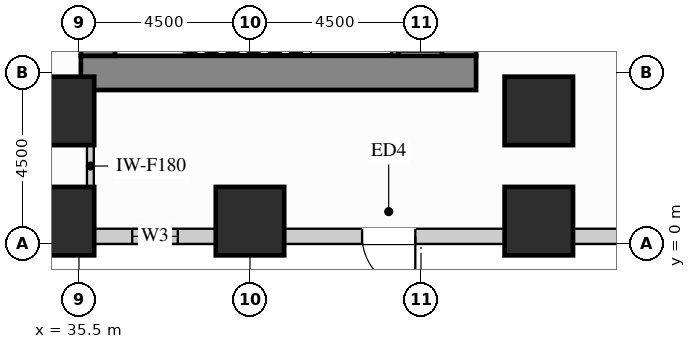
"""IFC4 building model, lengths in metres.
Left out: names, types, materials, properties, quantities, classifications, styles, units other than length and angle.
Written with IfcOpenShell. Run it as: python <this file> out.ifc"""

import sys

from ifc_helpers import new_model, si_unit, direction, frame, frame_2d, origin, origin_2d, place, context, subcontext, project, spatial, rectangle, extrude, source, transform, mapped, element, fill, save


model = new_model("IFC4")
c1 = context("Model", 3, precision=1e-05, world=origin(), true_north=direction((0.0, 1.0)))
c2 = subcontext(c1, "Body", "Model", "MODEL_VIEW")
j1 = project(units=[si_unit("LENGTHUNIT", "METRE"), si_unit("PLANEANGLEUNIT", "RADIAN")], contexts=[c1])
p1 = place(None, origin())
s1 = spatial("IfcSite", under=j1, at=p1, CompositionType="ELEMENT")
p2 = place(p1, origin())
s2 = spatial("IfcBuilding", under=s1, at=p2, CompositionType="ELEMENT")
p3 = place(p2, origin())
s3 = spatial("IfcBuildingStorey", under=s2, at=p3, CompositionType="ELEMENT", Elevation=0.0)
m1 = source(origin(), c2, "Body", "SweptSolid", [
    extrude(rectangle(XDim=1.8, YDim=1.8, at=origin_2d()), origin(), (0.0, 0.0, 1.0), 4.25),
])
for number, where, z_axis, x_axis in (
    (1, (35.0, 0.6, 0.0), (0.0, 0.0, 1.0), (1.0, 0.0, 0.0)),
    (2, (40.0, 0.6, 0.0), (0.0, 0.0, 1.0), (1.0, 0.0, 0.0)),
    (3, (47.6, 0.6, 0.0), (0.0, 0.0, 1.0), (1.0, 0.0, 0.0)),
    (4, (47.6, 3.5, 0.0), (0.0, 0.0, 1.0), (1.0, 0.0, 0.0)),
    (5, (35.0, 3.5, 0.0), (0.0, 0.0, 1.0), (1.0, 0.0, 0.0)),
):
    element("IfcColumn", number, at=place(p3, frame(where, z_axis=z_axis, x_axis=x_axis)), inside=s3, PredefinedType="COLUMN", context=c2, shape_type="MappedRepresentation", body=[
        mapped(m1, transform((0.0, 0.0, 0.0), x_axis=(1.0, 0.0, 0.0), y_axis=(0.0, 1.0, 0.0), z_axis=(0.0, 0.0, 1.0))),
    ])
m2 = source(origin(), c2, "Body", "SweptSolid", [
    extrude(rectangle(XDim=5.6, YDim=0.9, at=frame_2d((2.8, 0.0))), origin(), (0.0, 0.0, 1.0), 4.25),
])
p4 = place(p3, frame((45.5, 4.95, 0.0), z_axis=(0.0, 0.0, 1.0), x_axis=(0.0, 1.0, 0.0)))
e6 = element("IfcWall", 6, at=p4, inside=s3, PredefinedType="SHEAR", context=c2, shape_type="MappedRepresentation", body=[
    mapped(m2, transform((0.0, 0.0, 0.0), x_axis=(1.0, 0.0, 0.0), y_axis=(0.0, 1.0, 0.0), z_axis=(0.0, 0.0, 1.0))),
])
m3 = source(origin(), c2, "Body", "SweptSolid", [
    extrude(rectangle(XDim=10.4, YDim=0.9, at=frame_2d((5.2, 0.0))), origin(), (0.0, 0.0, 1.0), 4.25),
])
p5 = place(p3, frame((35.55, 4.5, 0.0), z_axis=(0.0, 0.0, 1.0), x_axis=(1.0, 0.0, 0.0)))
e7 = element("IfcWall", 7, at=p5, inside=s3, PredefinedType="SHEAR", context=c2, shape_type="MappedRepresentation", body=[
    mapped(m3, transform((0.0, 0.0, 0.0), x_axis=(1.0, 0.0, 0.0), y_axis=(0.0, 1.0, 0.0), z_axis=(0.0, 0.0, 1.0))),
])
p6 = place(p3, frame((36.0, 4.95, 0.0), z_axis=(0.0, 0.0, 1.0), x_axis=(0.0, 1.0, 0.0)))
e8 = element("IfcWall", 8, at=p6, inside=s3, PredefinedType="SHEAR", context=c2, shape_type="MappedRepresentation", body=[
    mapped(m2, transform((0.0, 0.0, 0.0), x_axis=(1.0, 0.0, 0.0), y_axis=(0.0, 1.0, 0.0), z_axis=(0.0, 0.0, 1.0))),
])
p7 = place(p3, frame((35.898, 0.2, 0.0), z_axis=(0.0, 0.0, 1.0), x_axis=(1.0, 0.0, 0.0)))
e9 = element("IfcWall", 9, at=p7, inside=s3, PredefinedType="SOLIDWALL", context=c2, shape_type="SweptSolid", body=[
    extrude(rectangle(XDim=3.204, YDim=0.4, at=frame_2d((1.602, 0.0))), origin(), (0.0, 0.0, 1.0), 3.135),
])
p8 = place(p7, frame((1.002, 0.0, 0.65)))
e10 = element("IfcOpeningElement", 10, at=p8, cuts=e9, PredefinedType="OPENING", context=c2, shape_type="SweptSolid", body=[
    extrude(rectangle(XDim=1.2, YDim=2.305, at=frame_2d((0.6, 1.152))), frame((0.0, 0.21, 0.0), z_axis=(0.0, -1.0, 0.0), x_axis=(1.0, 0.0, 0.0)), (0.0, 0.0, 1.0), 0.42),
])
p9 = place(p3, frame((40.898, 0.2, 0.0), z_axis=(0.0, 0.0, 1.0), x_axis=(1.0, 0.0, 0.0)))
e11 = element("IfcWall", 11, at=p9, inside=s3, PredefinedType="SOLIDWALL", context=c2, shape_type="SweptSolid", body=[
    extrude(rectangle(XDim=5.804, YDim=0.4, at=frame_2d((2.902, 0.0))), origin(), (0.0, 0.0, 1.0), 3.135),
])
p10 = place(p9, frame((2.052, 0.0, 0.0)))
e12 = element("IfcOpeningElement", 12, at=p10, cuts=e11, PredefinedType="OPENING", context=c2, shape_type="SweptSolid", body=[
    extrude(rectangle(XDim=1.4, YDim=2.2, at=frame_2d((0.7, 1.1))), frame((0.0, 0.21, 0.0), z_axis=(0.0, -1.0, 0.0), x_axis=(1.0, 0.0, 0.0)), (0.0, 0.0, 1.0), 0.42),
])
p11 = place(p3, frame((48.498, 0.2, 0.0), z_axis=(0.0, 0.0, 1.0), x_axis=(1.0, 0.0, 0.0)))
e13 = element("IfcWall", 13, at=p11, inside=s3, PredefinedType="SOLIDWALL", context=c2, shape_type="SweptSolid", body=[
    extrude(rectangle(XDim=9.004, YDim=0.4, at=frame_2d((4.502, 0.0))), origin(), (0.0, 0.0, 1.0), 3.135),
])
p12 = place(p11, frame((3.152, 0.0, 0.65)))
e14 = element("IfcOpeningElement", 14, at=p12, cuts=e13, PredefinedType="OPENING", context=c2, shape_type="SweptSolid", body=[
    extrude(rectangle(XDim=2.7, YDim=2.305, at=frame_2d((1.35, 1.152))), frame((0.0, 0.21, 0.0), z_axis=(0.0, -1.0, 0.0), x_axis=(1.0, 0.0, 0.0)), (0.0, 0.0, 1.0), 0.42),
])
m4 = source(origin(), c2, "Body", "SweptSolid", [
    extrude(rectangle(XDim=1.06, YDim=0.18, at=frame_2d((0.53, 0.0))), origin(), (0.0, 0.0, 1.0), 4.235),
])
p13 = place(p3, frame((35.8, 1.52, 0.0), z_axis=(0.0, 0.0, 1.0), x_axis=(0.0, 1.0, 0.0)))
e15 = element("IfcWall", 15, at=p13, inside=s3, PredefinedType="PARTITIONING", context=c2, shape_type="MappedRepresentation", body=[
    mapped(m4, transform((0.0, 0.0, 0.0), x_axis=(1.0, 0.0, 0.0), y_axis=(0.0, 1.0, 0.0), z_axis=(0.0, 0.0, 1.0))),
])
m5 = source(origin(), c2, "Body", "SweptSolid", [
    extrude(rectangle(XDim=3.603, YDim=0.2, at=frame_2d((1.802, 0.0))), origin(), (0.0, 0.0, 1.0), 4.25),
])
p14 = place(p3, frame((43.805, 4.952, 0.0), z_axis=(0.0, 0.0, 1.0), x_axis=(0.0, 1.0, 0.0)))
e16 = element("IfcWall", 16, at=p14, inside=s3, PredefinedType="SHEAR", context=c2, shape_type="MappedRepresentation", body=[
    mapped(m5, transform((0.0, 0.0, 0.0), x_axis=(1.0, 0.0, 0.0), y_axis=(0.0, 1.0, 0.0), z_axis=(0.0, 0.0, 1.0))),
])
m6 = source(origin(), c2, "Body", "SweptSolid", [
    extrude(rectangle(XDim=1.4, YDim=2.2, at=frame_2d((0.7, 1.1))), frame((0.0, 0.025, 0.0), z_axis=(0.0, -1.0, 0.0), x_axis=(1.0, 0.0, 0.0)), (0.0, 0.0, 1.0), 0.05),
])
p15 = place(p10, frame((1.4, 0.0, 0.0), z_axis=(0.0, 0.0, 1.0), x_axis=(-1.0, 0.0, 0.0)))
e17 = element("IfcDoor", 17, at=p15, inside=s3, OperationType="SINGLE_SWING_RIGHT", PredefinedType="DOOR", context=c2, shape_type="MappedRepresentation", body=[
    mapped(m6, transform((0.0, 0.0, 0.0), x_axis=(1.0, 0.0, 0.0), y_axis=(0.0, 1.0, 0.0), z_axis=(0.0, 0.0, 1.0))),
])
fill(e12, e17)
m7 = source(origin(), c2, "Body", "SweptSolid", [
    extrude(rectangle(XDim=1.2, YDim=2.305, at=frame_2d((0.6, 1.152))), frame((0.0, 0.03, 0.0), z_axis=(0.0, -1.0, 0.0), x_axis=(1.0, 0.0, 0.0)), (0.0, 0.0, 1.0), 0.06),
])
p16 = place(p8, origin())
e18 = element("IfcWindow", 18, at=p16, inside=s3, PartitioningType="SINGLE_PANEL", PredefinedType="WINDOW", context=c2, shape_type="MappedRepresentation", body=[
    mapped(m7, transform((0.0, 0.0, 0.0), x_axis=(1.0, 0.0, 0.0), y_axis=(0.0, 1.0, 0.0), z_axis=(0.0, 0.0, 1.0))),
])
fill(e10, e18)
save(model, sys.argv[1])
